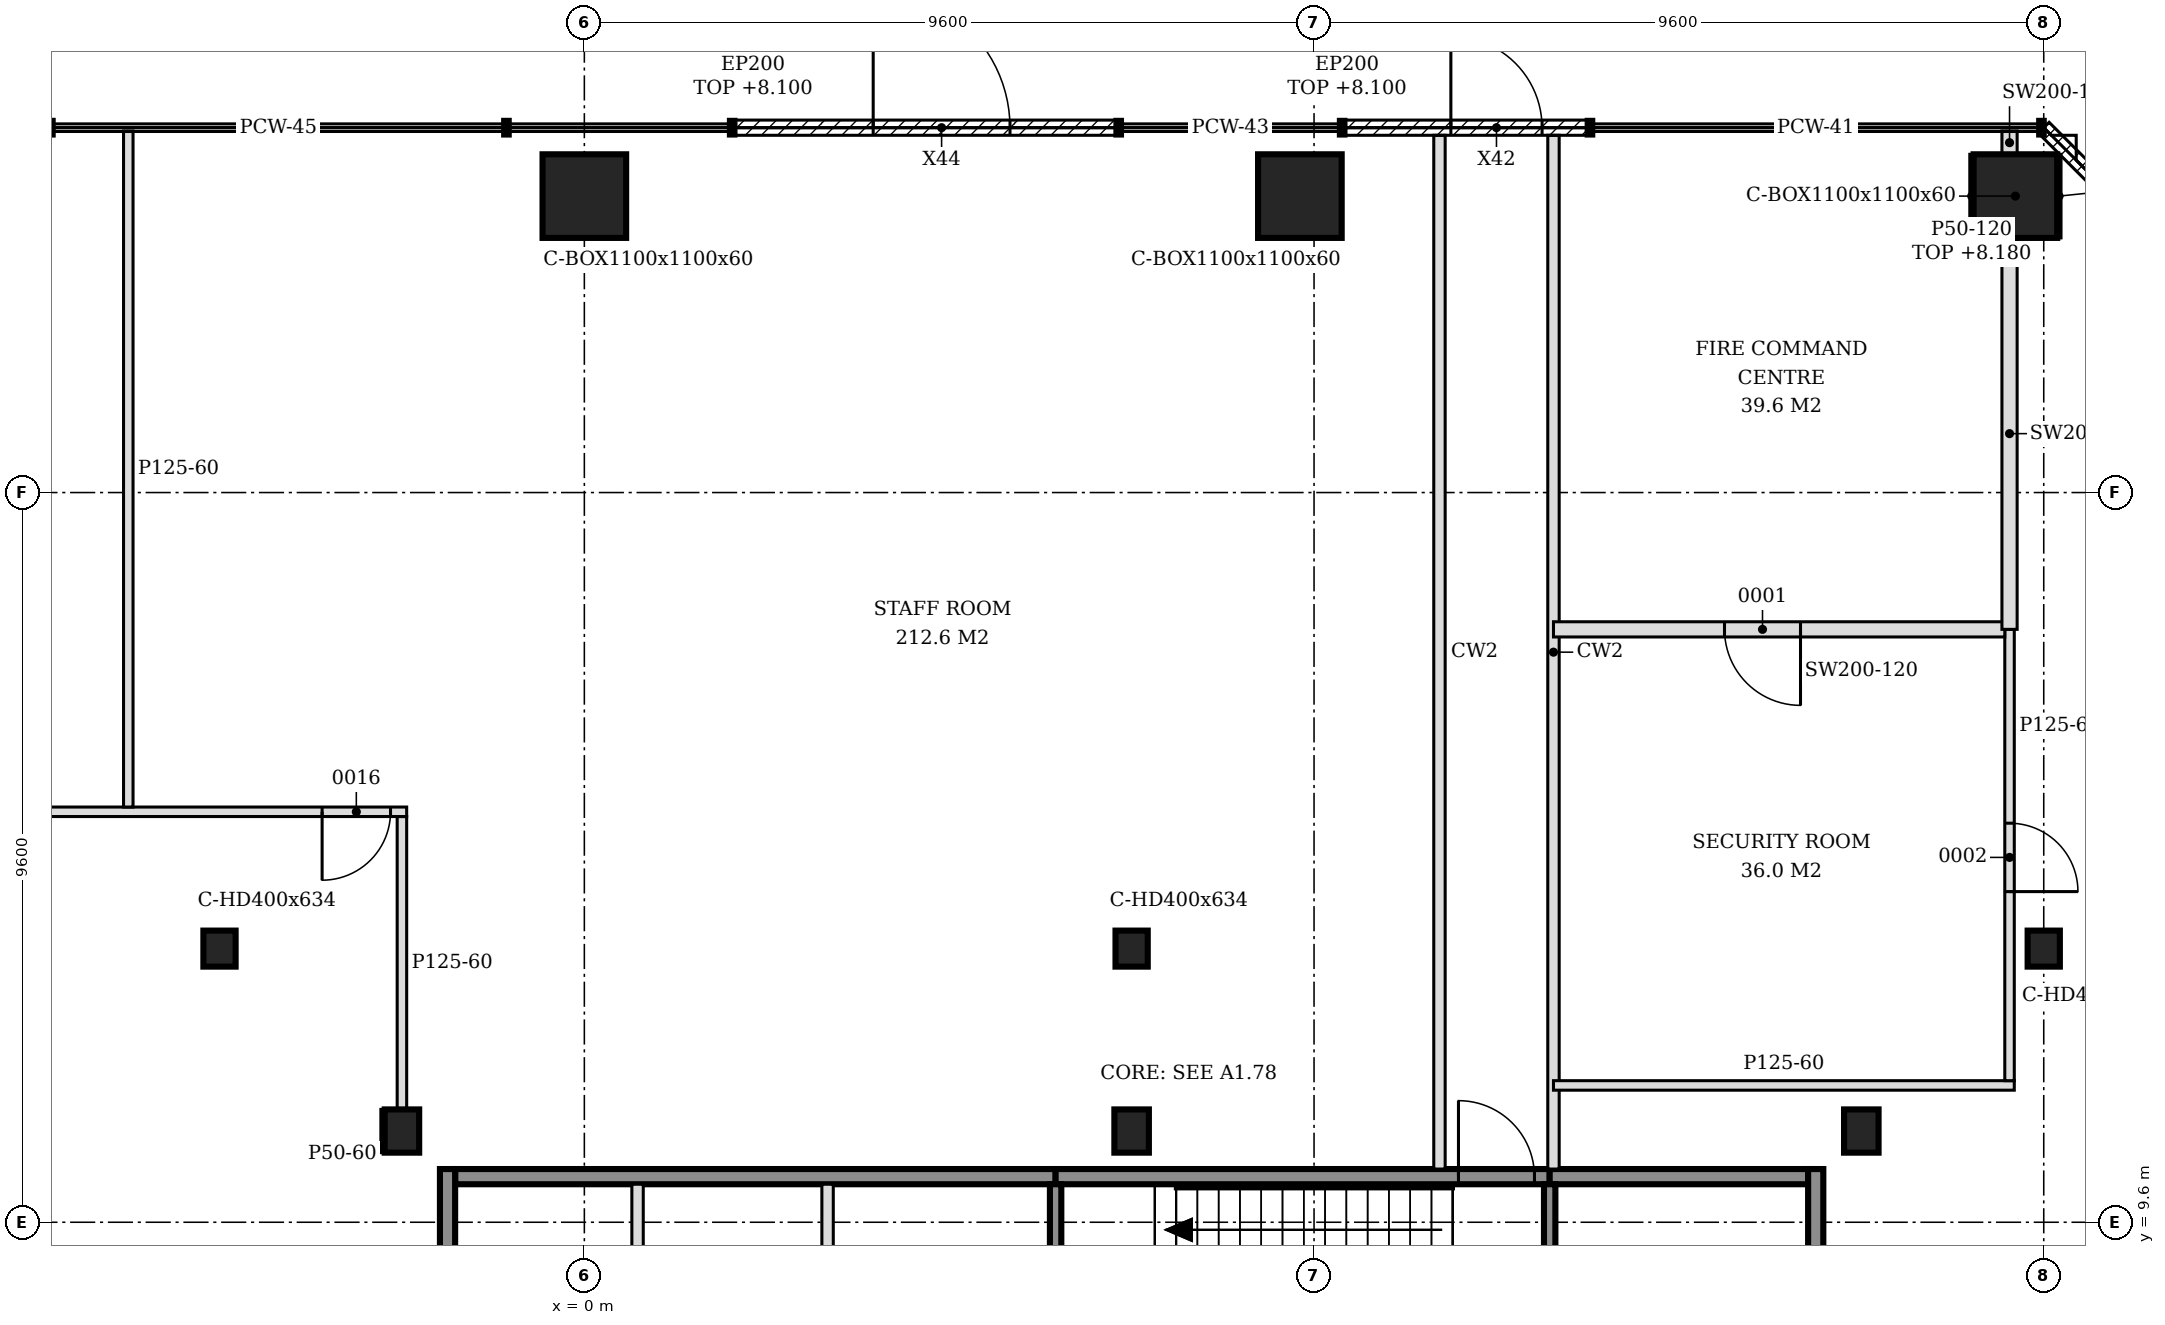
"""IFC4 building model, lengths in metres.
Left out: names, types, materials, properties, quantities, classifications, styles, units other than length and angle.
Written with IfcOpenShell. Run it as: python <this file> out.ifc"""

import sys

from ifc_helpers import new_model, si_unit, direction, frame, frame_2d, origin, origin_2d, place, context, subcontext, project, spatial, polyline, rectangle, hollow_rectangle, i_section, outline, extrude, element, fill, save


model = new_model("IFC4")
c1 = context("Model", 3, precision=1e-05, world=origin(), true_north=direction((0.0, 1.0)))
c2 = subcontext(c1, "Body", "Model", "MODEL_VIEW")
j1 = project(units=[si_unit("LENGTHUNIT", "METRE"), si_unit("PLANEANGLEUNIT", "RADIAN")], contexts=[c1])
p1 = place(None, origin())
s1 = spatial("IfcSite", under=j1, at=p1, CompositionType="ELEMENT")
p2 = place(p1, origin())
s2 = spatial("IfcBuilding", under=s1, at=p2, CompositionType="ELEMENT")
p3 = place(p2, origin())
s3 = spatial("IfcBuildingStorey", under=s2, at=p3, CompositionType="ELEMENT", Elevation=0.0)
for number, where, z_axis, x_axis in (
    (1, (18.827, 23.1, -0.25), (0.0, 0.0, 1.0), (1.0, 0.0, 0.0)),
    (2, (9.414, 23.1, -0.25), (0.0, 0.0, 1.0), (1.0, 0.0, 0.0)),
    (3, (0.0, 23.1, -0.25), (0.0, 0.0, 1.0), (1.0, 0.0, 0.0)),
):
    element("IfcColumn", number, at=place(p3, frame(where, z_axis=z_axis, x_axis=x_axis)), inside=s3, PredefinedType="COLUMN", context=c2, shape_type="SweptSolid", body=[
        extrude(hollow_rectangle(XDim=1.1, YDim=1.1, WallThickness=0.06, at=origin_2d()), origin(), (0.0, 0.0, 1.0), 9.05),
    ])
for number, where, z_axis, x_axis in (
    (4, (-4.8, 13.2, -0.25), (0.0, 0.0, 1.0), (1.0, 0.0, 0.0)),
    (5, (7.2, 13.2, -0.25), (0.0, 0.0, 1.0), (1.0, 0.0, 0.0)),
    (6, (19.2, 13.2, -0.25), (0.0, 0.0, 1.0), (1.0, 0.0, 0.0)),
):
    element("IfcColumn", number, at=place(p3, frame(where, z_axis=z_axis, x_axis=x_axis)), inside=s3, PredefinedType="COLUMN", context=c2, shape_type="SweptSolid", body=[
        extrude(i_section(OverallWidth=0.424, OverallDepth=0.474, WebThickness=0.048, FlangeThickness=0.077, FilletRadius=0.015, at=origin_2d()), origin(), (0.0, 0.0, 1.0), 9.05),
    ])
for number, where, z_axis, x_axis in (
    (7, (-2.4, 10.8, -0.25), (0.0, 0.0, 1.0), (1.0, 0.0, 0.0)),
    (8, (7.2, 10.8, -0.25), (0.0, 0.0, 1.0), (1.0, 0.0, 0.0)),
    (9, (16.8, 10.8, -0.25), (0.0, 0.0, 1.0), (1.0, 0.0, 0.0)),
):
    element("IfcColumn", number, at=place(p3, frame(where, z_axis=z_axis, x_axis=x_axis)), inside=s3, PredefinedType="COLUMN", context=c2, shape_type="SweptSolid", body=[
        extrude(i_section(OverallWidth=0.454, OverallDepth=0.569, WebThickness=0.078, FlangeThickness=0.125, FilletRadius=0.015, at=origin_2d()), origin(), (0.0, 0.0, 1.0), 9.05),
    ])
p4 = place(p3, frame((19.2, 24.0, 0.0), z_axis=(0.0, 0.0, 1.0), x_axis=(0.707106781187, -0.707106781187, 0.0)))
e10 = element("IfcWall", 10, at=p4, inside=s3, PredefinedType="SOLIDWALL", context=c2, shape_type="SweptSolid", body=[
    extrude(rectangle(XDim=6.788, YDim=0.2, at=frame_2d((3.394, 0.0))), origin(), (0.0, 0.0, 1.0), 8.1),
])
p5 = place(p4, frame((2.494, 0.0, 0.0)))
e11 = element("IfcOpeningElement", 11, at=p5, cuts=e10, PredefinedType="OPENING", context=c2, shape_type="SweptSolid", body=[
    extrude(rectangle(XDim=1.8, YDim=2.1, at=frame_2d((0.9, 1.05))), frame((0.0, 0.11, 0.0), z_axis=(0.0, -1.0, 0.0), x_axis=(1.0, 0.0, 0.0)), (0.0, 0.0, 1.0), 0.22),
])
p6 = place(p3, frame((10.0, 24.0, 0.0), z_axis=(0.0, 0.0, 1.0), x_axis=(1.0, 0.0, 0.0)))
e12 = element("IfcWall", 12, at=p6, inside=s3, PredefinedType="SOLIDWALL", context=c2, shape_type="SweptSolid", body=[
    extrude(rectangle(XDim=3.2, YDim=0.2, at=frame_2d((1.6, 0.0))), origin(), (0.0, 0.0, 1.0), 8.1),
])
p7 = place(p6, frame((1.4, 0.0, 0.0)))
e13 = element("IfcOpeningElement", 13, at=p7, cuts=e12, PredefinedType="OPENING", context=c2, shape_type="SweptSolid", body=[
    extrude(rectangle(XDim=1.2, YDim=2.1, at=frame_2d((0.6, 1.05))), frame((0.0, 0.11, 0.0), z_axis=(0.0, -1.0, 0.0), x_axis=(1.0, 0.0, 0.0)), (0.0, 0.0, 1.0), 0.22),
])
p8 = place(p3, frame((1.975, 24.0, 0.0), z_axis=(0.0, 0.0, 1.0), x_axis=(1.0, 0.0, 0.0)))
e14 = element("IfcWall", 14, at=p8, inside=s3, PredefinedType="SOLIDWALL", context=c2, shape_type="SweptSolid", body=[
    extrude(rectangle(XDim=5.025, YDim=0.2, at=frame_2d((2.512, 0.0))), origin(), (0.0, 0.0, 1.0), 8.1),
])
p9 = place(p8, frame((1.825, 0.0, 0.0)))
e15 = element("IfcOpeningElement", 15, at=p9, cuts=e14, PredefinedType="OPENING", context=c2, shape_type="SweptSolid", body=[
    extrude(rectangle(XDim=1.8, YDim=2.1, at=frame_2d((0.9, 1.05))), frame((0.0, 0.11, 0.0), z_axis=(0.0, -1.0, 0.0), x_axis=(1.0, 0.0, 0.0)), (0.0, 0.0, 1.0), 0.22),
])
p10 = place(p3, frame((-1.7, 10.2, 0.0), z_axis=(0.0, 0.0, 1.0), x_axis=(1.0, 0.0, 0.0)))
e16 = element("IfcWall", 16, at=p10, inside=s3, PredefinedType="SOLIDWALL", context=c2, shape_type="SweptSolid", body=[
    extrude(rectangle(XDim=7.9, YDim=0.2, at=frame_2d((3.95, 0.0))), origin(), (0.0, 0.0, 1.0), 8.8),
])
p11 = place(p3, frame((6.2, 10.2, 0.0), z_axis=(0.0, 0.0, 1.0), x_axis=(1.0, 0.0, 0.0)))
e17 = element("IfcWall", 17, at=p11, inside=s3, PredefinedType="SOLIDWALL", context=c2, shape_type="SweptSolid", body=[
    extrude(rectangle(XDim=6.5, YDim=0.2, at=frame_2d((3.25, 0.0))), origin(), (0.0, 0.0, 1.0), 8.8),
])
p12 = place(p11, frame((5.3, 0.0, 0.0)))
e18 = element("IfcOpeningElement", 18, at=p12, cuts=e17, PredefinedType="OPENING", context=c2, shape_type="SweptSolid", body=[
    extrude(rectangle(XDim=1.0, YDim=2.1, at=frame_2d((0.5, 1.05))), frame((0.0, 0.11, 0.0), z_axis=(0.0, -1.0, 0.0), x_axis=(1.0, 0.0, 0.0)), (0.0, 0.0, 1.0), 0.22),
])
p13 = place(p3, frame((12.7, 10.2, 0.0), z_axis=(0.0, 0.0, 1.0), x_axis=(1.0, 0.0, 0.0)))
e19 = element("IfcWall", 19, at=p13, inside=s3, PredefinedType="SOLIDWALL", context=c2, shape_type="SweptSolid", body=[
    extrude(rectangle(XDim=3.4, YDim=0.2, at=frame_2d((1.7, 0.0))), origin(), (0.0, 0.0, 1.0), 8.8),
])
p14 = place(p3, frame((-1.8, -5.5, 0.0), z_axis=(0.0, 0.0, 1.0), x_axis=(0.0, 1.0, 0.0)))
e20 = element("IfcWall", 20, at=p14, inside=s3, PredefinedType="SOLIDWALL", context=c2, shape_type="SweptSolid", body=[
    extrude(rectangle(XDim=15.8, YDim=0.2, at=frame_2d((7.9, 0.0))), origin(), (0.0, 0.0, 1.0), 8.8),
])
p15 = place(p14, frame((3.05, 0.0, 0.0)))
e21 = element("IfcOpeningElement", 21, at=p15, cuts=e20, PredefinedType="OPENING", context=c2, shape_type="SweptSolid", body=[
    extrude(rectangle(XDim=1.3, YDim=2.1, at=frame_2d((0.65, 1.05))), frame((0.0, 0.11, 0.0), z_axis=(0.0, -1.0, 0.0), x_axis=(1.0, 0.0, 0.0)), (0.0, 0.0, 1.0), 0.22),
])
p16 = place(p14, frame((11.45, 0.0, 0.0)))
e22 = element("IfcOpeningElement", 22, at=p16, cuts=e20, PredefinedType="OPENING", context=c2, shape_type="SweptSolid", body=[
    extrude(rectangle(XDim=1.3, YDim=2.1, at=frame_2d((0.65, 1.05))), frame((0.0, 0.11, 0.0), z_axis=(0.0, -1.0, 0.0), x_axis=(1.0, 0.0, 0.0)), (0.0, 0.0, 1.0), 0.22),
])
p17 = place(p3, frame((0.7, 7.575, 0.0), z_axis=(0.0, 0.0, 1.0), x_axis=(0.0, 1.0, 0.0)))
e23 = element("IfcWall", 23, at=p17, inside=s3, PredefinedType="PARTITIONING", context=c2, shape_type="SweptSolid", body=[
    extrude(rectangle(XDim=2.525, YDim=0.15, at=frame_2d((1.263, 0.0))), origin(), (0.0, 0.0, 1.0), 8.8),
])
for number, where, z_axis, x_axis in (
    (24, (3.2, 7.425, 0.0), (0.0, 0.0, 1.0), (0.0, 1.0, 0.0)),
    (25, (6.2, 7.425, 0.0), (0.0, 0.0, 1.0), (0.0, 1.0, 0.0)),
):
    element("IfcWall", number, at=place(p3, frame(where, z_axis=z_axis, x_axis=x_axis)), inside=s3, PredefinedType="SOLIDWALL", context=c2, shape_type="SweptSolid", body=[
        extrude(rectangle(XDim=2.675, YDim=0.15, at=frame_2d((1.337, 0.0))), origin(), (0.0, 0.0, 1.0), 8.8),
    ])
p18 = place(p3, frame((12.7, 7.575, 0.0), z_axis=(0.0, 0.0, 1.0), x_axis=(0.0, 1.0, 0.0)))
e26 = element("IfcWall", 26, at=p18, inside=s3, PredefinedType="SOLIDWALL", context=c2, shape_type="SweptSolid", body=[
    extrude(rectangle(XDim=2.525, YDim=0.15, at=frame_2d((1.263, 0.0))), origin(), (0.0, 0.0, 1.0), 8.8),
])
p19 = place(p3, frame((16.2, -5.5, 0.0), z_axis=(0.0, 0.0, 1.0), x_axis=(0.0, 1.0, 0.0)))
e27 = element("IfcWall", 27, at=p19, inside=s3, PredefinedType="SOLIDWALL", context=c2, shape_type="SweptSolid", body=[
    extrude(rectangle(XDim=15.8, YDim=0.2, at=frame_2d((7.9, 0.0))), origin(), (0.0, 0.0, 1.0), 8.8),
])
p20 = place(p19, frame((3.05, 0.0, 0.0)))
e28 = element("IfcOpeningElement", 28, at=p20, cuts=e27, PredefinedType="OPENING", context=c2, shape_type="SweptSolid", body=[
    extrude(rectangle(XDim=1.3, YDim=2.1, at=frame_2d((0.65, 1.05))), frame((0.0, 0.11, 0.0), z_axis=(0.0, -1.0, 0.0), x_axis=(1.0, 0.0, 0.0)), (0.0, 0.0, 1.0), 0.22),
])
p21 = place(p19, frame((11.45, 0.0, 0.0)))
e29 = element("IfcOpeningElement", 29, at=p21, cuts=e27, PredefinedType="OPENING", context=c2, shape_type="SweptSolid", body=[
    extrude(rectangle(XDim=1.3, YDim=2.1, at=frame_2d((0.65, 1.05))), frame((0.0, 0.11, 0.0), z_axis=(0.0, -1.0, 0.0), x_axis=(1.0, 0.0, 0.0)), (0.0, 0.0, 1.0), 0.22),
])
for number, where, z_axis, x_axis in (
    (30, (11.25, 10.3, 0.0), (0.0, 0.0, 1.0), (0.0, 1.0, 0.0)),
    (31, (12.75, 10.3, 0.0), (0.0, 0.0, 1.0), (0.0, 1.0, 0.0)),
):
    element("IfcWall", number, at=place(p3, frame(where, z_axis=z_axis, x_axis=x_axis)), inside=s3, PredefinedType="SOLIDWALL", context=c2, shape_type="SweptSolid", body=[
        extrude(rectangle(XDim=13.6, YDim=0.15, at=frame_2d((6.8, 0.0))), origin(), (0.0, 0.0, 1.0), 8.8),
    ])
p22 = place(p3, frame((-2.4, 11.084, 0.0), z_axis=(0.0, 0.0, 1.0), x_axis=(0.0, 1.0, 0.0)))
e32 = element("IfcWall", 32, at=p22, inside=s3, PredefinedType="PARTITIONING", context=c2, shape_type="SweptSolid", body=[
    extrude(outline(polyline([(0.0, 0.0), (3.853, 0.0), (3.853, 8.8), (2.265, 8.8), (2.263, 8.08), (1.966, 8.08), (1.963, 8.8), (0.0, 8.8), (0.0, 0.0)])), frame((0.0, 0.062, 0.0), z_axis=(0.0, -1.0, 0.0), x_axis=(1.0, 0.0, 0.0)), (0.0, 0.0, 1.0), 0.125),
])
p23 = place(p3, frame((12.75, 11.4, 0.0), z_axis=(0.0, 0.0, 1.0), x_axis=(1.0, 0.0, 0.0)))
e33 = element("IfcWall", 33, at=p23, inside=s3, PredefinedType="PARTITIONING", context=c2, shape_type="SweptSolid", body=[
    extrude(rectangle(XDim=6.062, YDim=0.125, at=frame_2d((3.031, 0.0))), origin(), (0.0, 0.0, 1.0), 8.8),
])
p24 = place(p3, frame((18.75, 11.462, 0.0), z_axis=(0.0, 0.0, 1.0), x_axis=(0.0, 1.0, 0.0)))
e34 = element("IfcWall", 34, at=p24, inside=s3, PredefinedType="PARTITIONING", context=c2, shape_type="SweptSolid", body=[
    extrude(outline(polyline([(0.0, 0.0), (5.938, 0.0), (5.938, 8.8), (1.887, 8.8), (1.885, 8.08), (1.587, 8.08), (1.585, 8.8), (0.0, 8.8), (0.0, 0.0)])), frame((0.0, 0.062, 0.0), z_axis=(0.0, -1.0, 0.0), x_axis=(1.0, 0.0, 0.0)), (0.0, 0.0, 1.0), 0.125),
])
p25 = place(p24, frame((2.488, 0.0, 0.0)))
e35 = element("IfcOpeningElement", 35, at=p25, cuts=e34, PredefinedType="OPENING", context=c2, shape_type="SweptSolid", body=[
    extrude(rectangle(XDim=0.9, YDim=2.1, at=frame_2d((0.45, 1.05))), frame((0.0, 0.073, 0.0), z_axis=(0.0, -1.0, 0.0), x_axis=(1.0, 0.0, 0.0)), (0.0, 0.0, 1.0), 0.145),
])
p26 = place(p3, frame((-18.938, 15.0, 0.0), z_axis=(0.0, 0.0, 1.0), x_axis=(1.0, 0.0, 0.0)))
e36 = element("IfcWall", 36, at=p26, inside=s3, PredefinedType="PARTITIONING", context=c2, shape_type="SweptSolid", body=[
    extrude(outline(polyline([(0.0, 0.0), (16.6, 0.0), (16.6, 8.8), (14.238, 8.8), (14.236, 8.28), (14.038, 8.28), (14.035, 8.8), (9.448, 8.8), (9.446, 8.18), (9.228, 8.18), (9.226, 8.8), (4.637, 8.8), (4.635, 8.28), (4.438, 8.28), (4.436, 8.8), (0.0, 8.8), (0.0, 0.0)])), frame((0.0, 0.062, 0.0), z_axis=(0.0, -1.0, 0.0), x_axis=(1.0, 0.0, 0.0)), (0.0, 0.0, 1.0), 0.125),
])
p27 = place(p26, frame((15.488, 0.0, 0.0)))
e37 = element("IfcOpeningElement", 37, at=p27, cuts=e36, PredefinedType="OPENING", context=c2, shape_type="SweptSolid", body=[
    extrude(rectangle(XDim=0.9, YDim=2.1, at=frame_2d((0.45, 1.05))), frame((0.0, 0.073, 0.0), z_axis=(0.0, -1.0, 0.0), x_axis=(1.0, 0.0, 0.0)), (0.0, 0.0, 1.0), 0.145),
])
p28 = place(p3, frame((-6.0, 15.062, 0.0), z_axis=(0.0, 0.0, 1.0), x_axis=(0.0, 1.0, 0.0)))
e38 = element("IfcWall", 38, at=p28, inside=s3, PredefinedType="PARTITIONING", context=c2, shape_type="SweptSolid", body=[
    extrude(outline(polyline([(0.0, 0.0), (8.894, 0.0), (8.894, 8.8), (8.188, 8.8), (8.186, 8.18), (7.887, 8.18), (7.885, 8.8), (0.0, 8.8), (0.0, 0.0)])), frame((0.0, 0.062, 0.0), z_axis=(0.0, -1.0, 0.0), x_axis=(1.0, 0.0, 0.0)), (0.0, 0.0, 1.0), 0.125),
])
p29 = place(p3, frame((12.75, 17.4, 0.0), z_axis=(0.0, 0.0, 1.0), x_axis=(1.0, 0.0, 0.0)))
e39 = element("IfcWall", 39, at=p29, inside=s3, PredefinedType="PARTITIONING", context=c2, shape_type="SweptSolid", body=[
    extrude(outline(polyline([(0.0, 0.0), (5.938, 0.0), (5.938, 8.8), (1.75, 8.8), (1.748, 8.28), (1.55, 8.28), (1.548, 8.8), (0.0, 8.8), (0.0, 0.0)])), frame((0.0, 0.1, 0.0), z_axis=(0.0, -1.0, 0.0), x_axis=(1.0, 0.0, 0.0)), (0.0, 0.0, 1.0), 0.2),
])
p30 = place(p29, frame((2.25, 0.0, 0.0)))
e40 = element("IfcOpeningElement", 40, at=p30, cuts=e39, PredefinedType="OPENING", context=c2, shape_type="SweptSolid", body=[
    extrude(rectangle(XDim=1.0, YDim=2.1, at=frame_2d((0.5, 1.05))), frame((0.0, 0.11, 0.0), z_axis=(0.0, -1.0, 0.0), x_axis=(1.0, 0.0, 0.0)), (0.0, 0.0, 1.0), 0.22),
])
p31 = place(p3, frame((18.75, 17.4, 0.0), z_axis=(0.0, 0.0, 1.0), x_axis=(0.0, 1.0, 0.0)))
e41 = element("IfcWall", 41, at=p31, inside=s3, PredefinedType="PARTITIONING", context=c2, shape_type="SweptSolid", body=[
    extrude(rectangle(XDim=5.15, YDim=0.2, at=frame_2d((2.575, 0.0))), origin(), (0.0, 0.0, 1.0), 8.8),
])
p32 = place(p3, frame((18.75, 23.65, 0.0), z_axis=(0.0, 0.0, 1.0), x_axis=(0.0, 1.0, 0.0)))
e42 = element("IfcWall", 42, at=p32, inside=s3, PredefinedType="PARTITIONING", context=c2, shape_type="SweptSolid", body=[
    extrude(rectangle(XDim=0.306, YDim=0.2, at=frame_2d((0.153, 0.0))), origin(), (0.0, 0.0, 1.0), 8.8),
])
p33 = place(p3, frame((-2.652, 10.515, 0.0), z_axis=(0.0, 0.0, 1.0), x_axis=(0.0, 1.0, 0.0)))
e43 = element("IfcWall", 43, at=p33, inside=s3, PredefinedType="PARTITIONING", context=c2, shape_type="SweptSolid", body=[
    extrude(rectangle(XDim=0.569, YDim=0.05, at=frame_2d((0.285, 0.0))), origin(), (0.0, 0.0, 1.0), 8.8),
])
for number, where, z_axis, x_axis in (
    (44, (18.252, 22.55, 0.0), (0.0, 0.0, 1.0), (0.0, 1.0, 0.0)),
    (45, (19.402, 22.55, 0.0), (0.0, 0.0, 1.0), (0.0, 1.0, 0.0)),
):
    element("IfcWall", number, at=place(p3, frame(where, z_axis=z_axis, x_axis=x_axis)), inside=s3, PredefinedType="PARTITIONING", context=c2, shape_type="SweptSolid", body=[
        extrude(rectangle(XDim=1.1, YDim=0.05, at=frame_2d((0.55, 0.0))), origin(), (0.0, 0.0, 1.0), 8.18),
    ])
p34 = place(p7, origin())
e46 = element("IfcDoor", 46, at=p34, inside=s3, OperationType="SINGLE_SWING_LEFT", PredefinedType="DOOR", context=c2, shape_type="SweptSolid", body=[
    extrude(rectangle(XDim=1.2, YDim=2.1, at=frame_2d((0.6, 1.05))), frame((0.0, 0.025, 0.0), z_axis=(0.0, -1.0, 0.0), x_axis=(1.0, 0.0, 0.0)), (0.0, 0.0, 1.0), 0.05),
])
fill(e13, e46)
p35 = place(p9, origin())
e47 = element("IfcDoor", 47, at=p35, inside=s3, OperationType="SINGLE_SWING_LEFT", PredefinedType="DOOR", context=c2, shape_type="SweptSolid", body=[
    extrude(rectangle(XDim=1.8, YDim=2.1, at=frame_2d((0.9, 1.05))), frame((0.0, 0.025, 0.0), z_axis=(0.0, -1.0, 0.0), x_axis=(1.0, 0.0, 0.0)), (0.0, 0.0, 1.0), 0.05),
])
fill(e15, e47)
p36 = place(p12, origin())
e48 = element("IfcDoor", 48, at=p36, inside=s3, OperationType="SINGLE_SWING_LEFT", PredefinedType="DOOR", context=c2, shape_type="SweptSolid", body=[
    extrude(rectangle(XDim=1.0, YDim=2.1, at=frame_2d((0.5, 1.05))), frame((0.0, 0.025, 0.0), z_axis=(0.0, -1.0, 0.0), x_axis=(1.0, 0.0, 0.0)), (0.0, 0.0, 1.0), 0.05),
])
fill(e18, e48)
p37 = place(p30, frame((1.0, 0.0, 0.0), z_axis=(0.0, 0.0, 1.0), x_axis=(-1.0, 0.0, 0.0)))
e49 = element("IfcDoor", 49, at=p37, inside=s3, OperationType="SINGLE_SWING_LEFT", PredefinedType="DOOR", context=c2, shape_type="SweptSolid", body=[
    extrude(rectangle(XDim=1.0, YDim=2.1, at=frame_2d((0.5, 1.05))), frame((0.0, 0.025, 0.0), z_axis=(0.0, -1.0, 0.0), x_axis=(1.0, 0.0, 0.0)), (0.0, 0.0, 1.0), 0.05),
])
fill(e40, e49)
p38 = place(p25, frame((0.9, 0.0, 0.0), z_axis=(0.0, 0.0, 1.0), x_axis=(-1.0, 0.0, 0.0)))
e50 = element("IfcDoor", 50, at=p38, inside=s3, OperationType="SINGLE_SWING_RIGHT", PredefinedType="DOOR", context=c2, shape_type="SweptSolid", body=[
    extrude(rectangle(XDim=0.9, YDim=2.1, at=frame_2d((0.45, 1.05))), frame((0.0, 0.025, 0.0), z_axis=(0.0, -1.0, 0.0), x_axis=(1.0, 0.0, 0.0)), (0.0, 0.0, 1.0), 0.05),
])
fill(e35, e50)
p39 = place(p27, frame((0.9, 0.0, 0.0), z_axis=(0.0, 0.0, 1.0), x_axis=(-1.0, 0.0, 0.0)))
e51 = element("IfcDoor", 51, at=p39, inside=s3, OperationType="SINGLE_SWING_RIGHT", PredefinedType="DOOR", context=c2, shape_type="SweptSolid", body=[
    extrude(rectangle(XDim=0.9, YDim=2.1, at=frame_2d((0.45, 1.05))), frame((0.0, 0.025, 0.0), z_axis=(0.0, -1.0, 0.0), x_axis=(1.0, 0.0, 0.0)), (0.0, 0.0, 1.0), 0.05),
])
fill(e37, e51)
save(model, sys.argv[1])
